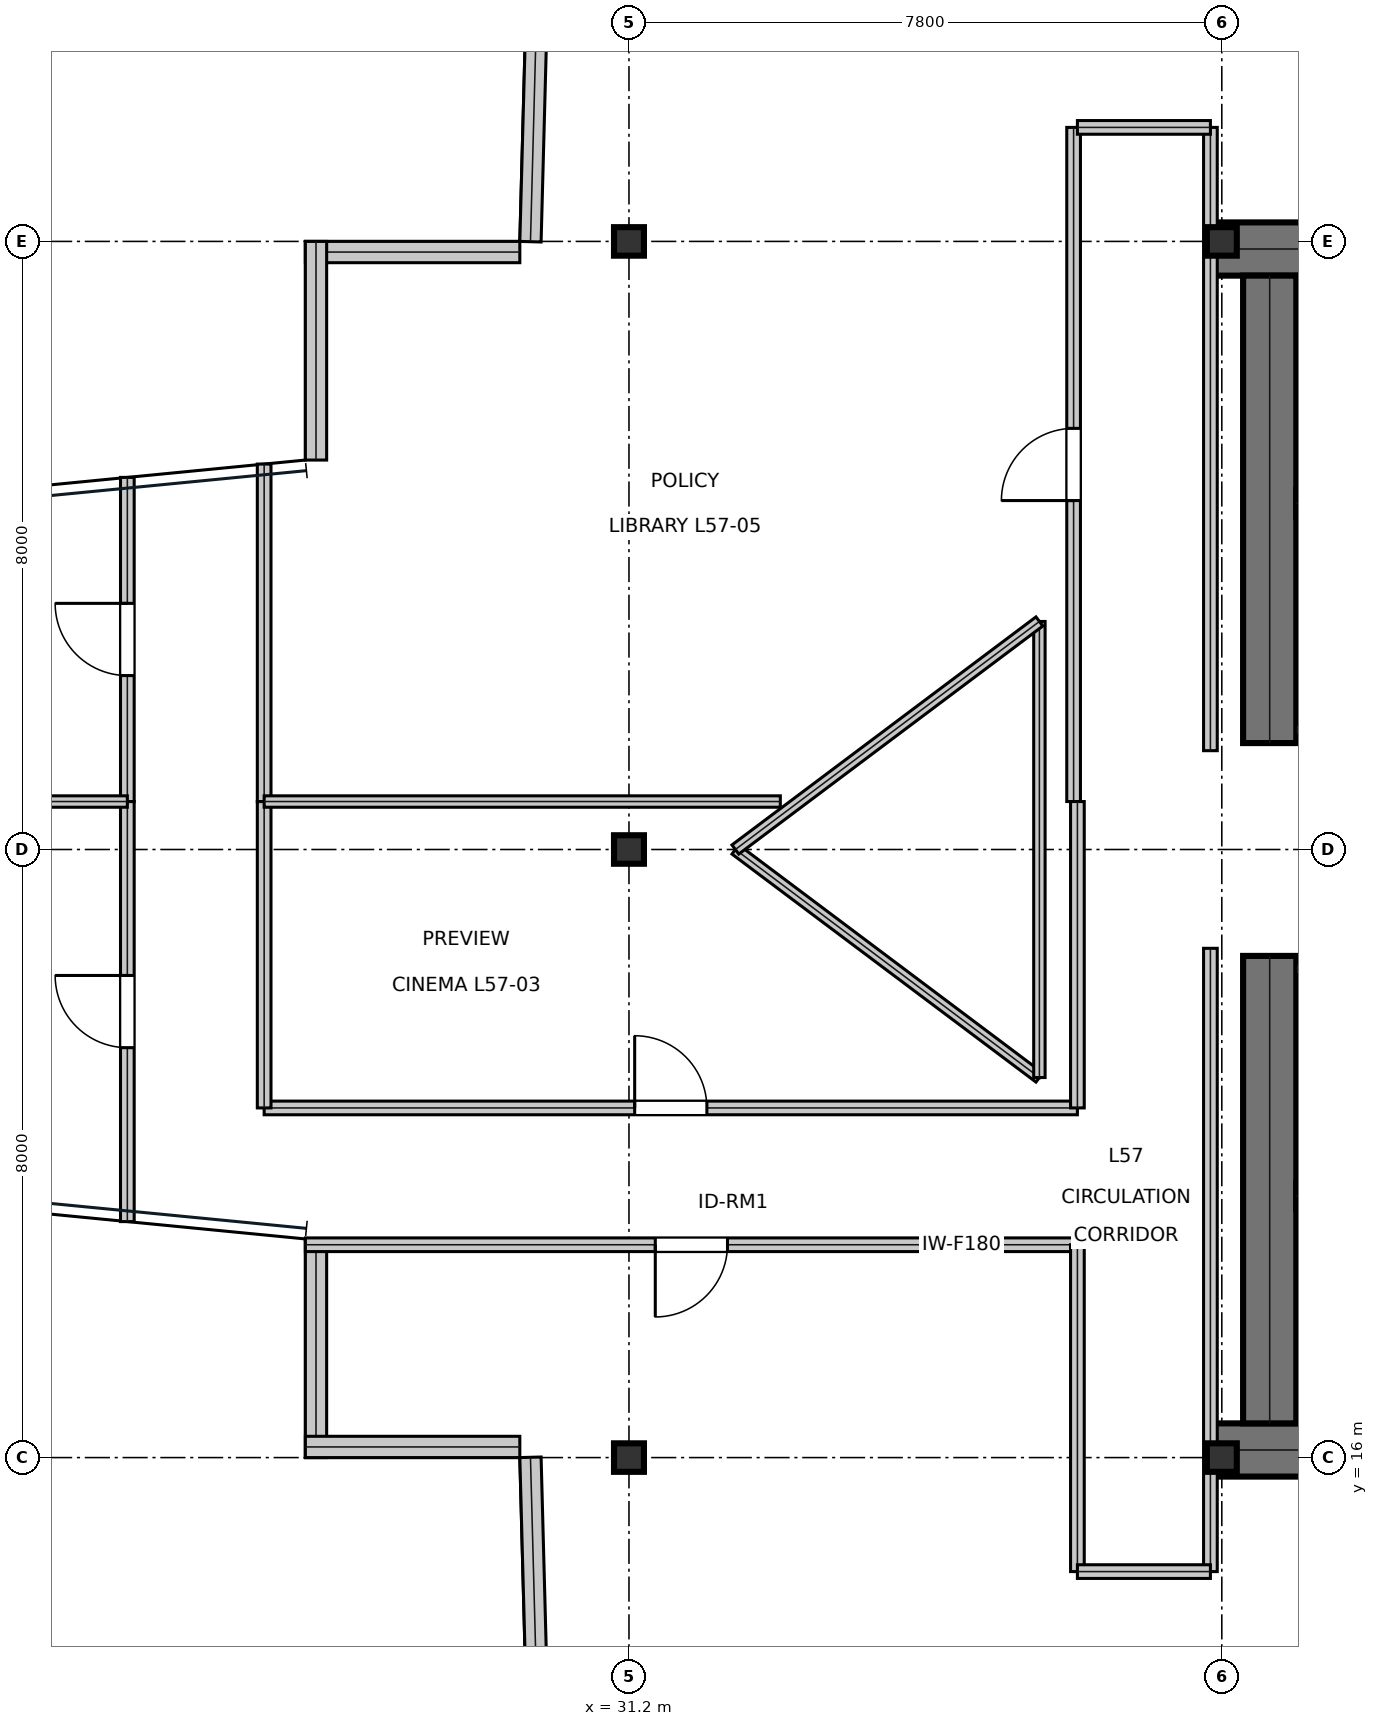
"""IFC4 building model, lengths in metres.
Left out: names, types, materials, properties, quantities, classifications, styles, units other than length and angle.
Written with IfcOpenShell. Run it as: python <this file> out.ifc"""

import sys

from ifc_helpers import new_model, si_unit, direction, frame, frame_2d, origin, origin_2d, place, context, subcontext, project, spatial, rectangle, i_section, extrude, element, fill, save


model = new_model("IFC4")
c1 = context("Model", 3, precision=1e-05, world=origin(), true_north=direction((0.0, 1.0)))
c2 = subcontext(c1, "Body", "Model", "MODEL_VIEW")
j1 = project(units=[si_unit("LENGTHUNIT", "METRE"), si_unit("PLANEANGLEUNIT", "RADIAN")], contexts=[c1])
p1 = place(None, origin())
s1 = spatial("IfcSite", under=j1, at=p1, CompositionType="ELEMENT")
p2 = place(p1, origin())
s2 = spatial("IfcBuilding", under=s1, at=p2, CompositionType="ELEMENT")
p3 = place(p2, frame((0.0, 0.0, 244.5)))
s3 = spatial("IfcBuildingStorey", under=s2, at=p3, CompositionType="ELEMENT", Elevation=244.5)
for number, where, z_axis, x_axis in (
    (1, (38.8, 31.9, 0.0), (0.0, 0.0, 1.0), (1.0, 0.0, 0.0)),
    (2, (38.8, 16.1, 0.0), (0.0, 0.0, 1.0), (1.0, 0.0, 0.0)),
):
    element("IfcWall", number, at=place(p3, frame(where, z_axis=z_axis, x_axis=x_axis)), inside=s3, PredefinedType="SHEAR", context=c2, shape_type="SweptSolid", body=[
        extrude(rectangle(XDim=16.0, YDim=0.7, at=frame_2d((8.0, 0.0))), origin(), (0.0, 0.0, 1.0), 3.79),
    ])
for number, where, z_axis, x_axis in (
    (3, (39.63, 16.45, 0.0), (0.0, 0.0, 1.0), (0.0, 1.0, 0.0)),
    (4, (39.63, 25.4, 0.0), (0.0, 0.0, 1.0), (0.0, 1.0, 0.0)),
):
    element("IfcWall", number, at=place(p3, frame(where, z_axis=z_axis, x_axis=x_axis)), inside=s3, PredefinedType="SHEAR", context=c2, shape_type="SweptSolid", body=[
        extrude(rectangle(XDim=6.15, YDim=0.7, at=frame_2d((3.075, 0.0))), origin(), (0.0, 0.0, 1.0), 3.79),
    ])
p4 = place(p3, frame((39.98, 28.555, 0.0), z_axis=(0.0, 0.0, 1.0), x_axis=(1.0, 0.0, 0.0)))
e5 = element("IfcWall", 5, at=p4, inside=s3, PredefinedType="SHEAR", context=c2, shape_type="SweptSolid", body=[
    extrude(rectangle(XDim=7.71, YDim=0.35, at=frame_2d((3.855, 0.0))), origin(), (0.0, 0.0, 1.0), 3.79),
])
p5 = place(p4, frame((0.25, 0.0, 0.0)))
e6 = element("IfcOpeningElement", 6, at=p5, cuts=e5, PredefinedType="OPENING", context=c2, shape_type="SweptSolid", body=[
    extrude(rectangle(XDim=1.1, YDim=2.15, at=frame_2d((0.55, 1.075))), frame((0.0, 0.185, 0.0), z_axis=(0.0, -1.0, 0.0), x_axis=(1.0, 0.0, 0.0)), (0.0, 0.0, 1.0), 0.37),
])
p6 = place(p3, frame((39.98, 19.445, 0.0), z_axis=(0.0, 0.0, 1.0), x_axis=(1.0, 0.0, 0.0)))
e7 = element("IfcWall", 7, at=p6, inside=s3, PredefinedType="SHEAR", context=c2, shape_type="SweptSolid", body=[
    extrude(rectangle(XDim=7.71, YDim=0.35, at=frame_2d((3.855, 0.0))), origin(), (0.0, 0.0, 1.0), 3.79),
])
p7 = place(p6, frame((0.25, 0.0, 0.0)))
e8 = element("IfcOpeningElement", 8, at=p7, cuts=e7, PredefinedType="OPENING", context=c2, shape_type="SweptSolid", body=[
    extrude(rectangle(XDim=1.1, YDim=2.15, at=frame_2d((0.55, 1.075))), frame((0.0, 0.185, 0.0), z_axis=(0.0, -1.0, 0.0), x_axis=(1.0, 0.0, 0.0)), (0.0, 0.0, 1.0), 0.37),
])
for number, where, z_axis, x_axis in (
    (9, (31.2, 16.0, 0.0), (0.0, 0.0, 1.0), (1.0, 0.0, 0.0)),
    (10, (31.2, 24.0, 0.0), (0.0, 0.0, 1.0), (1.0, 0.0, 0.0)),
    (11, (31.2, 32.0, 0.0), (0.0, 0.0, 1.0), (1.0, 0.0, 0.0)),
    (12, (39.0, 16.0, 0.0), (0.0, 0.0, 1.0), (1.0, 0.0, 0.0)),
    (13, (39.0, 32.0, 0.0), (0.0, 0.0, 1.0), (1.0, 0.0, 0.0)),
):
    element("IfcColumn", number, at=place(p3, frame(where, z_axis=z_axis, x_axis=x_axis)), inside=s3, PredefinedType="COLUMN", context=c2, shape_type="SweptSolid", body=[
        extrude(i_section(OverallWidth=0.394, OverallDepth=0.375, WebThickness=0.017, FlangeThickness=0.028, at=origin_2d()), origin(), (0.0, 0.0, 1.0), 4.044),
    ])
p8 = place(p3, frame((30.083, 38.723, 0.0), z_axis=(0.0, 0.0, 1.0), x_axis=(-0.026702629768, -0.999643421208, 0.0)))
e14 = element("IfcWall", 14, at=p8, inside=s3, PredefinedType="STANDARD", context=c2, shape_type="SweptSolid", body=[
    extrude(rectangle(XDim=6.729, YDim=0.28, at=frame_2d((3.365, 0.0))), origin(), (0.0, 0.0, 1.0), 3.79),
])
p9 = place(p3, frame((29.764, 31.86, 0.0), z_axis=(0.0, 0.0, 1.0), x_axis=(-1.0, 0.0, 0.0)))
e15 = element("IfcWall", 15, at=p9, inside=s3, PredefinedType="STANDARD", context=c2, shape_type="SweptSolid", body=[
    extrude(rectangle(XDim=2.822, YDim=0.28, at=frame_2d((1.411, 0.0))), origin(), (0.0, 0.0, 1.0), 3.79),
])
for number, where, z_axis, x_axis in (
    (16, (27.083, 32.0, 0.0), (0.0, 0.0, 1.0), (0.0, -1.0, 0.0)),
    (17, (27.083, 18.876, 0.0), (0.0, 0.0, 1.0), (0.0, -1.0, 0.0)),
):
    element("IfcWall", number, at=place(p3, frame(where, z_axis=z_axis, x_axis=x_axis)), inside=s3, PredefinedType="STANDARD", context=c2, shape_type="SweptSolid", body=[
        extrude(rectangle(XDim=2.876, YDim=0.28, at=frame_2d((1.438, 0.0))), origin(), (0.0, 0.0, 1.0), 3.319),
    ])
p10 = place(p3, frame((26.942, 16.14, 0.0), z_axis=(0.0, 0.0, 1.0), x_axis=(1.0, 0.0, 0.0)))
e18 = element("IfcWall", 18, at=p10, inside=s3, PredefinedType="STANDARD", context=c2, shape_type="SweptSolid", body=[
    extrude(rectangle(XDim=2.822, YDim=0.28, at=frame_2d((1.411, 0.0))), origin(), (0.0, 0.0, 1.0), 3.79),
])
p11 = place(p3, frame((29.904, 16.004, 0.0), z_axis=(0.0, 0.0, 1.0), x_axis=(0.026702629768, -0.999643421208, 0.0)))
e19 = element("IfcWall", 19, at=p11, inside=s3, PredefinedType="STANDARD", context=c2, shape_type="SweptSolid", body=[
    extrude(rectangle(XDim=6.729, YDim=0.28, at=frame_2d((3.365, 0.0))), origin(), (0.0, 0.0, 1.0), 3.79),
])
p12 = place(p3, frame((39.98, 25.575, 0.0), z_axis=(0.0, 0.0, 1.0), x_axis=(1.0, 0.0, 0.0)))
e20 = element("IfcWall", 20, at=p12, inside=s3, PredefinedType="PARTITIONING", context=c2, shape_type="SweptSolid", body=[
    extrude(rectangle(XDim=5.9, YDim=0.15, at=frame_2d((2.95, 0.0))), origin(), (0.0, 0.0, 1.0), 3.79),
])
p13 = place(p12, frame((2.35, 0.0, 0.0)))
e21 = element("IfcOpeningElement", 21, at=p13, cuts=e20, PredefinedType="OPENING", context=c2, shape_type="SweptSolid", body=[
    extrude(rectangle(XDim=1.05, YDim=2.15, at=frame_2d((0.525, 1.075))), frame((0.0, 0.085, 0.0), z_axis=(0.0, -1.0, 0.0), x_axis=(1.0, 0.0, 0.0)), (0.0, 0.0, 1.0), 0.17),
])
p14 = place(p3, frame((39.98, 22.425, 0.0), z_axis=(0.0, 0.0, 1.0), x_axis=(1.0, 0.0, 0.0)))
e22 = element("IfcWall", 22, at=p14, inside=s3, PredefinedType="PARTITIONING", context=c2, shape_type="SweptSolid", body=[
    extrude(rectangle(XDim=5.9, YDim=0.15, at=frame_2d((2.95, 0.0))), origin(), (0.0, 0.0, 1.0), 3.79),
])
p15 = place(p14, frame((2.35, 0.0, 0.0)))
e23 = element("IfcOpeningElement", 23, at=p15, cuts=e22, PredefinedType="OPENING", context=c2, shape_type="SweptSolid", body=[
    extrude(rectangle(XDim=1.05, YDim=2.15, at=frame_2d((0.525, 1.075))), frame((0.0, 0.085, 0.0), z_axis=(0.0, -1.0, 0.0), x_axis=(1.0, 0.0, 0.0)), (0.0, 0.0, 1.0), 0.17),
])
p16 = place(p3, frame((26.942, 18.8, 0.0), z_axis=(0.0, 0.0, 1.0), x_axis=(1.0, 0.0, 0.0)))
e24 = element("IfcWall", 24, at=p16, inside=s3, PredefinedType="SOLIDWALL", context=c2, shape_type="SweptSolid", body=[
    extrude(rectangle(XDim=10.158, YDim=0.18, at=frame_2d((5.079, 0.0))), origin(), (0.0, 0.0, 1.0), 3.241),
])
p17 = place(p16, frame((4.604, 0.0, 0.0)))
e25 = element("IfcOpeningElement", 25, at=p17, cuts=e24, PredefinedType="OPENING", context=c2, shape_type="SweptSolid", body=[
    extrude(rectangle(XDim=0.95, YDim=2.15, at=frame_2d((0.475, 1.075))), frame((0.0, 0.1, 0.0), z_axis=(0.0, -1.0, 0.0), x_axis=(1.0, 0.0, 0.0)), (0.0, 0.0, 1.0), 0.2),
])
p18 = place(p3, frame((24.6, 19.104, 0.0), z_axis=(0.0, 0.0, 1.0), x_axis=(0.0, 1.0, 0.0)))
e26 = element("IfcWall", 26, at=p18, inside=s3, PredefinedType="SOLIDWALL", context=c2, shape_type="SweptSolid", body=[
    extrude(rectangle(XDim=5.527, YDim=0.18, at=frame_2d((2.763, 0.0))), origin(), (0.0, 0.0, 1.0), 3.241),
])
p19 = place(p18, frame((2.288, 0.0, 0.0)))
e27 = element("IfcOpeningElement", 27, at=p19, cuts=e26, PredefinedType="OPENING", context=c2, shape_type="SweptSolid", body=[
    extrude(rectangle(XDim=0.95, YDim=2.15, at=frame_2d((0.475, 1.075))), frame((0.0, 0.1, 0.0), z_axis=(0.0, -1.0, 0.0), x_axis=(1.0, 0.0, 0.0)), (0.0, 0.0, 1.0), 0.2),
])
p20 = place(p3, frame((26.4, 20.6, 0.0), z_axis=(0.0, 0.0, 1.0), x_axis=(1.0, 0.0, 0.0)))
e28 = element("IfcWall", 28, at=p20, inside=s3, PredefinedType="SOLIDWALL", context=c2, shape_type="SweptSolid", body=[
    extrude(rectangle(XDim=10.7, YDim=0.18, at=frame_2d((5.35, 0.0))), origin(), (0.0, 0.0, 1.0), 3.241),
])
p21 = place(p20, frame((4.875, 0.0, 0.0)))
e29 = element("IfcOpeningElement", 29, at=p21, cuts=e28, PredefinedType="OPENING", context=c2, shape_type="SweptSolid", body=[
    extrude(rectangle(XDim=0.95, YDim=2.15, at=frame_2d((0.475, 1.075))), frame((0.0, 0.1, 0.0), z_axis=(0.0, -1.0, 0.0), x_axis=(1.0, 0.0, 0.0)), (0.0, 0.0, 1.0), 0.2),
])
p22 = place(p3, frame((24.6, 24.631, 0.0), z_axis=(0.0, 0.0, 1.0), x_axis=(0.0, 1.0, 0.0)))
e30 = element("IfcWall", 30, at=p22, inside=s3, PredefinedType="SOLIDWALL", context=c2, shape_type="SweptSolid", body=[
    extrude(rectangle(XDim=4.264, YDim=0.18, at=frame_2d((2.132, 0.0))), origin(), (0.0, 0.0, 1.0), 3.241),
])
p23 = place(p22, frame((1.657, 0.0, 0.0)))
e31 = element("IfcOpeningElement", 31, at=p23, cuts=e30, PredefinedType="OPENING", context=c2, shape_type="SweptSolid", body=[
    extrude(rectangle(XDim=0.95, YDim=2.15, at=frame_2d((0.475, 1.075))), frame((0.0, 0.1, 0.0), z_axis=(0.0, -1.0, 0.0), x_axis=(1.0, 0.0, 0.0)), (0.0, 0.0, 1.0), 0.2),
])
p24 = place(p3, frame((37.05, 24.631, 0.0), z_axis=(0.0, 0.0, 1.0), x_axis=(0.0, 1.0, 0.0)))
e32 = element("IfcWall", 32, at=p24, inside=s3, PredefinedType="SOLIDWALL", context=c2, shape_type="SweptSolid", body=[
    extrude(rectangle(XDim=8.869, YDim=0.18, at=frame_2d((4.435, 0.0))), origin(), (0.0, 0.0, 1.0), 3.241),
])
p25 = place(p24, frame((3.959, 0.0, 0.0)))
e33 = element("IfcOpeningElement", 33, at=p25, cuts=e32, PredefinedType="OPENING", context=c2, shape_type="SweptSolid", body=[
    extrude(rectangle(XDim=0.95, YDim=2.15, at=frame_2d((0.475, 1.075))), frame((0.0, 0.1, 0.0), z_axis=(0.0, -1.0, 0.0), x_axis=(1.0, 0.0, 0.0)), (0.0, 0.0, 1.0), 0.2),
])
p26 = place(p3, frame((38.85, 14.5, 0.0), z_axis=(0.0, 0.0, 1.0), x_axis=(0.0, 1.0, 0.0)))
e34 = element("IfcWall", 34, at=p26, inside=s3, PredefinedType="SOLIDWALL", context=c2, shape_type="SweptSolid", body=[
    extrude(rectangle(XDim=8.2, YDim=0.18, at=frame_2d((4.1, 0.0))), origin(), (0.0, 0.0, 1.0), 3.241),
])
p27 = place(p3, frame((37.1, 14.5, 0.0), z_axis=(0.0, 0.0, 1.0), x_axis=(0.0, 1.0, 0.0)))
e35 = element("IfcWall", 35, at=p27, inside=s3, PredefinedType="SOLIDWALL", context=c2, shape_type="SweptSolid", body=[
    extrude(rectangle(XDim=4.3, YDim=0.18, at=frame_2d((2.15, 0.0))), origin(), (0.0, 0.0, 1.0), 3.241),
])
p28 = place(p3, frame((37.1, 14.5, 0.0), z_axis=(0.0, 0.0, 1.0), x_axis=(1.0, 0.0, 0.0)))
e36 = element("IfcWall", 36, at=p28, inside=s3, PredefinedType="SOLIDWALL", context=c2, shape_type="SweptSolid", body=[
    extrude(rectangle(XDim=1.75, YDim=0.18, at=frame_2d((0.875, 0.0))), origin(), (0.0, 0.0, 1.0), 3.241),
])
p29 = place(p3, frame((26.4, 20.6, 0.0), z_axis=(0.0, 0.0, 1.0), x_axis=(0.0, 1.0, 0.0)))
e37 = element("IfcWall", 37, at=p29, inside=s3, PredefinedType="SOLIDWALL", context=c2, shape_type="SweptSolid", body=[
    extrude(rectangle(XDim=4.031, YDim=0.18, at=frame_2d((2.016, 0.0))), origin(), (0.0, 0.0, 1.0), 3.241),
])
p30 = place(p3, frame((37.1, 20.6, 0.0), z_axis=(0.0, 0.0, 1.0), x_axis=(0.0, 1.0, 0.0)))
e38 = element("IfcWall", 38, at=p30, inside=s3, PredefinedType="SOLIDWALL", context=c2, shape_type="SweptSolid", body=[
    extrude(rectangle(XDim=4.031, YDim=0.18, at=frame_2d((2.016, 0.0))), origin(), (0.0, 0.0, 1.0), 3.79),
])
p31 = place(p3, frame((38.85, 25.3, 0.0), z_axis=(0.0, 0.0, 1.0), x_axis=(0.0, 1.0, 0.0)))
e39 = element("IfcWall", 39, at=p31, inside=s3, PredefinedType="SOLIDWALL", context=c2, shape_type="SweptSolid", body=[
    extrude(rectangle(XDim=8.2, YDim=0.18, at=frame_2d((4.1, 0.0))), origin(), (0.0, 0.0, 1.0), 3.241),
])
p32 = place(p3, frame((26.4, 24.631, 0.0), z_axis=(0.0, 0.0, 1.0), x_axis=(0.0, 1.0, 0.0)))
e40 = element("IfcWall", 40, at=p32, inside=s3, PredefinedType="SOLIDWALL", context=c2, shape_type="SweptSolid", body=[
    extrude(rectangle(XDim=4.44, YDim=0.18, at=frame_2d((2.22, 0.0))), origin(), (0.0, 0.0, 1.0), 3.241),
])
p33 = place(p3, frame((37.1, 33.5, 0.0), z_axis=(0.0, 0.0, 1.0), x_axis=(1.0, 0.0, 0.0)))
e41 = element("IfcWall", 41, at=p33, inside=s3, PredefinedType="SOLIDWALL", context=c2, shape_type="SweptSolid", body=[
    extrude(rectangle(XDim=1.75, YDim=0.18, at=frame_2d((0.875, 0.0))), origin(), (0.0, 0.0, 1.0), 3.241),
])
p34 = place(p3, frame((14.791, 24.631, 0.0), z_axis=(0.0, 0.0, 1.0), x_axis=(1.0, 0.0, 0.0)))
e42 = element("IfcWall", 42, at=p34, inside=s3, PredefinedType="MOVABLE", context=c2, shape_type="SweptSolid", body=[
    extrude(rectangle(XDim=9.809, YDim=0.15, at=frame_2d((4.905, 0.0))), origin(), (0.0, 0.0, 1.0), 3.468),
])
p35 = place(p3, frame((26.4, 24.631, 0.0), z_axis=(0.0, 0.0, 1.0), x_axis=(1.0, 0.0, 0.0)))
e43 = element("IfcWall", 43, at=p35, inside=s3, PredefinedType="MOVABLE", context=c2, shape_type="SweptSolid", body=[
    extrude(rectangle(XDim=6.792, YDim=0.15, at=frame_2d((3.396, 0.0))), origin(), (0.0, 0.0, 1.0), 3.241),
])
p36 = place(p3, frame((32.6, 24.0, 0.0), z_axis=(0.0, 0.0, 1.0), x_axis=(0.8, -0.6, 0.0)))
e44 = element("IfcWall", 44, at=p36, inside=s3, PredefinedType="MOVABLE", context=c2, shape_type="SweptSolid", body=[
    extrude(rectangle(XDim=5.0, YDim=0.15, at=frame_2d((2.5, 0.0))), origin(), (0.0, 0.0, 1.0), 3.79),
])
p37 = place(p3, frame((36.6, 21.0, 0.0), z_axis=(0.0, 0.0, 1.0), x_axis=(0.0, 1.0, 0.0)))
e45 = element("IfcWall", 45, at=p37, inside=s3, PredefinedType="MOVABLE", context=c2, shape_type="SweptSolid", body=[
    extrude(rectangle(XDim=6.0, YDim=0.15, at=frame_2d((3.0, 0.0))), origin(), (0.0, 0.0, 1.0), 3.79),
])
p38 = place(p3, frame((36.6, 27.0, 0.0), z_axis=(0.0, 0.0, 1.0), x_axis=(-0.8, -0.6, 0.0)))
e46 = element("IfcWall", 46, at=p38, inside=s3, PredefinedType="MOVABLE", context=c2, shape_type="SweptSolid", body=[
    extrude(rectangle(XDim=5.0, YDim=0.15, at=frame_2d((2.5, 0.0))), origin(), (0.0, 0.0, 1.0), 3.79),
])
p39 = place(p17, frame((0.95, 0.0, 0.0), z_axis=(0.0, 0.0, 1.0), x_axis=(-1.0, 0.0, 0.0)))
e47 = element("IfcDoor", 47, at=p39, inside=s3, OperationType="SINGLE_SWING_RIGHT", PredefinedType="DOOR", context=c2, shape_type="SweptSolid", body=[
    extrude(rectangle(XDim=0.95, YDim=2.15, at=frame_2d((0.475, 1.075))), frame((0.0, 0.025, 0.0), z_axis=(0.0, -1.0, 0.0), x_axis=(1.0, 0.0, 0.0)), (0.0, 0.0, 1.0), 0.05),
])
fill(e25, e47)
p40 = place(p19, origin())
e48 = element("IfcDoor", 48, at=p40, inside=s3, OperationType="SINGLE_SWING_RIGHT", PredefinedType="DOOR", context=c2, shape_type="SweptSolid", body=[
    extrude(rectangle(XDim=0.95, YDim=2.15, at=frame_2d((0.475, 1.075))), frame((0.0, 0.025, 0.0), z_axis=(0.0, -1.0, 0.0), x_axis=(1.0, 0.0, 0.0)), (0.0, 0.0, 1.0), 0.05),
])
fill(e27, e48)
p41 = place(p21, origin())
e49 = element("IfcDoor", 49, at=p41, inside=s3, OperationType="SINGLE_SWING_LEFT", PredefinedType="DOOR", context=c2, shape_type="SweptSolid", body=[
    extrude(rectangle(XDim=0.95, YDim=2.15, at=frame_2d((0.475, 1.075))), frame((0.0, 0.025, 0.0), z_axis=(0.0, -1.0, 0.0), x_axis=(1.0, 0.0, 0.0)), (0.0, 0.0, 1.0), 0.05),
])
fill(e29, e49)
p42 = place(p23, origin())
e50 = element("IfcDoor", 50, at=p42, inside=s3, OperationType="SINGLE_SWING_RIGHT", PredefinedType="DOOR", context=c2, shape_type="SweptSolid", body=[
    extrude(rectangle(XDim=0.95, YDim=2.15, at=frame_2d((0.475, 1.075))), frame((0.0, 0.025, 0.0), z_axis=(0.0, -1.0, 0.0), x_axis=(1.0, 0.0, 0.0)), (0.0, 0.0, 1.0), 0.05),
])
fill(e31, e50)
p43 = place(p25, origin())
e51 = element("IfcDoor", 51, at=p43, inside=s3, OperationType="SINGLE_SWING_LEFT", PredefinedType="DOOR", context=c2, shape_type="SweptSolid", body=[
    extrude(rectangle(XDim=0.95, YDim=2.15, at=frame_2d((0.475, 1.075))), frame((0.0, 0.025, 0.0), z_axis=(0.0, -1.0, 0.0), x_axis=(1.0, 0.0, 0.0)), (0.0, 0.0, 1.0), 0.05),
])
fill(e33, e51)
save(model, sys.argv[1])
